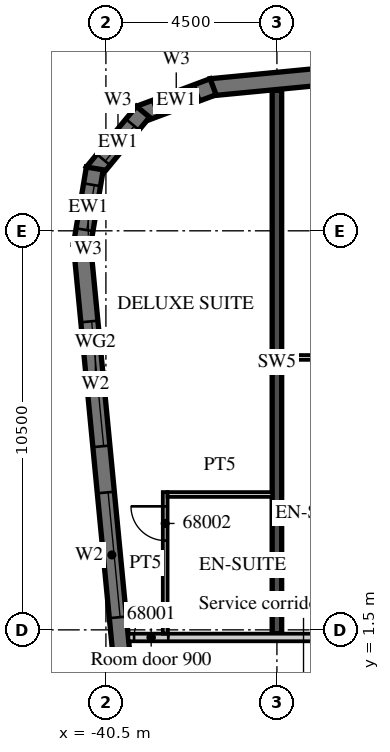
"""IFC4 building model, lengths in metres.
Left out: names, types, materials, properties, quantities, classifications, styles, units other than length and angle.
Written with IfcOpenShell. Run it as: python <this file> out.ifc"""

import sys

from ifc_helpers import new_model, si_unit, direction, frame, frame_2d, origin, place, context, subcontext, project, spatial, polyline, rectangle, outline, extrude, element, fill, save


model = new_model("IFC4")
c1 = context("Model", 3, precision=1e-05, world=origin(), true_north=direction((0.0, 1.0)))
c2 = subcontext(c1, "Body", "Model", "MODEL_VIEW")
j1 = project(units=[si_unit("LENGTHUNIT", "METRE"), si_unit("PLANEANGLEUNIT", "RADIAN")], contexts=[c1])
p1 = place(None, origin())
s1 = spatial("IfcSite", under=j1, at=p1, CompositionType="ELEMENT")
p2 = place(p1, origin())
s2 = spatial("IfcBuilding", under=s1, at=p2, CompositionType="ELEMENT")
p3 = place(p2, frame((0.0, 0.0, 275.1)))
s3 = spatial("IfcBuildingStorey", under=s2, at=p3, CompositionType="ELEMENT", Elevation=275.1)
p4 = place(p3, frame((-36.0, 1.4, 0.0), z_axis=(0.0, 0.0, 1.0), x_axis=(0.0, 1.0, 0.0)))
e1 = element("IfcWall", 1, at=p4, inside=s3, PredefinedType="SHEAR", context=c2, shape_type="SweptSolid", body=[
    extrude(rectangle(XDim=14.296, YDim=0.25, at=frame_2d((7.148, 0.0))), origin(), (0.0, 0.0, 1.0), 3.3),
])
p5 = place(p3, frame((-41.132, 11.658, 0.0), z_axis=(0.0, 0.0, 1.0), x_axis=(0.095847749461, -0.995396006082, 0.0)))
e2 = element("IfcWall", 2, at=p5, inside=s3, PredefinedType="SOLIDWALL", context=c2, shape_type="SweptSolid", body=[
    extrude(rectangle(XDim=32.0, YDim=0.45, at=frame_2d((16.0, 0.0))), origin(), (0.0, 0.0, 1.0), 3.02),
])
p6 = place(p5, frame((2.053, 0.0, 0.45)))
e3 = element("IfcOpeningElement", 3, at=p6, cuts=e2, PredefinedType="OPENING", context=c2, shape_type="SweptSolid", body=[
    extrude(rectangle(XDim=3.3, YDim=2.25, at=frame_2d((1.65, 1.125))), frame((0.0, 0.235, 0.0), z_axis=(0.0, -1.0, 0.0), x_axis=(1.0, 0.0, 0.0)), (0.0, 0.0, 1.0), 0.47),
])
p7 = place(p5, frame((6.574, 0.0, 0.45)))
e4 = element("IfcOpeningElement", 4, at=p7, cuts=e2, PredefinedType="OPENING", context=c2, shape_type="SweptSolid", body=[
    extrude(rectangle(XDim=3.3, YDim=2.25, at=frame_2d((1.65, 1.125))), frame((0.0, 0.235, 0.0), z_axis=(0.0, -1.0, 0.0), x_axis=(1.0, 0.0, 0.0)), (0.0, 0.0, 1.0), 0.47),
])
p8 = place(p3, frame((13.521, 20.713, 0.0), z_axis=(0.0, 0.0, 1.0), x_axis=(-0.995396277313, -0.095844932638, 0.0)))
e5 = element("IfcWall", 5, at=p8, inside=s3, PredefinedType="SOLIDWALL", context=c2, shape_type="SweptSolid", body=[
    extrude(rectangle(XDim=51.495, YDim=0.45, at=frame_2d((25.748, 0.0))), origin(), (0.0, 0.0, 1.0), 3.02),
])
p9 = place(p8, frame((0.91, 0.0, 0.45)))
e6 = element("IfcOpeningElement", 6, at=p9, cuts=e5, PredefinedType="OPENING", context=c2, shape_type="SweptSolid", body=[
    extrude(rectangle(XDim=2.7, YDim=2.25, at=frame_2d((1.35, 1.125))), frame((0.0, 0.235, 0.0), z_axis=(0.0, -1.0, 0.0), x_axis=(1.0, 0.0, 0.0)), (0.0, 0.0, 1.0), 0.47),
])
p10 = place(p8, frame((5.431, 0.0, 0.45)))
e7 = element("IfcOpeningElement", 7, at=p10, cuts=e5, PredefinedType="OPENING", context=c2, shape_type="SweptSolid", body=[
    extrude(rectangle(XDim=2.7, YDim=2.25, at=frame_2d((1.35, 1.125))), frame((0.0, 0.235, 0.0), z_axis=(0.0, -1.0, 0.0), x_axis=(1.0, 0.0, 0.0)), (0.0, 0.0, 1.0), 0.47),
])
p11 = place(p8, frame((9.952, 0.0, 0.45)))
e8 = element("IfcOpeningElement", 8, at=p11, cuts=e5, PredefinedType="OPENING", context=c2, shape_type="SweptSolid", body=[
    extrude(rectangle(XDim=2.7, YDim=2.25, at=frame_2d((1.35, 1.125))), frame((0.0, 0.235, 0.0), z_axis=(0.0, -1.0, 0.0), x_axis=(1.0, 0.0, 0.0)), (0.0, 0.0, 1.0), 0.47),
])
p12 = place(p8, frame((14.473, 0.0, 0.45)))
e9 = element("IfcOpeningElement", 9, at=p12, cuts=e5, PredefinedType="OPENING", context=c2, shape_type="SweptSolid", body=[
    extrude(rectangle(XDim=2.7, YDim=2.25, at=frame_2d((1.35, 1.125))), frame((0.0, 0.235, 0.0), z_axis=(0.0, -1.0, 0.0), x_axis=(1.0, 0.0, 0.0)), (0.0, 0.0, 1.0), 0.47),
])
p13 = place(p8, frame((18.994, 0.0, 0.45)))
e10 = element("IfcOpeningElement", 10, at=p13, cuts=e5, PredefinedType="OPENING", context=c2, shape_type="SweptSolid", body=[
    extrude(rectangle(XDim=2.7, YDim=2.25, at=frame_2d((1.35, 1.125))), frame((0.0, 0.235, 0.0), z_axis=(0.0, -1.0, 0.0), x_axis=(1.0, 0.0, 0.0)), (0.0, 0.0, 1.0), 0.47),
])
p14 = place(p8, frame((23.514, 0.0, 0.45)))
e11 = element("IfcOpeningElement", 11, at=p14, cuts=e5, PredefinedType="OPENING", context=c2, shape_type="SweptSolid", body=[
    extrude(rectangle(XDim=2.7, YDim=2.25, at=frame_2d((1.35, 1.125))), frame((0.0, 0.235, 0.0), z_axis=(0.0, -1.0, 0.0), x_axis=(1.0, 0.0, 0.0)), (0.0, 0.0, 1.0), 0.47),
])
p15 = place(p8, frame((28.035, 0.0, 0.45)))
e12 = element("IfcOpeningElement", 12, at=p15, cuts=e5, PredefinedType="OPENING", context=c2, shape_type="SweptSolid", body=[
    extrude(rectangle(XDim=2.7, YDim=2.25, at=frame_2d((1.35, 1.125))), frame((0.0, 0.235, 0.0), z_axis=(0.0, -1.0, 0.0), x_axis=(1.0, 0.0, 0.0)), (0.0, 0.0, 1.0), 0.47),
])
p16 = place(p8, frame((32.556, 0.0, 0.45)))
e13 = element("IfcOpeningElement", 13, at=p16, cuts=e5, PredefinedType="OPENING", context=c2, shape_type="SweptSolid", body=[
    extrude(rectangle(XDim=2.7, YDim=2.25, at=frame_2d((1.35, 1.125))), frame((0.0, 0.235, 0.0), z_axis=(0.0, -1.0, 0.0), x_axis=(1.0, 0.0, 0.0)), (0.0, 0.0, 1.0), 0.47),
])
p17 = place(p8, frame((37.077, 0.0, 0.45)))
e14 = element("IfcOpeningElement", 14, at=p17, cuts=e5, PredefinedType="OPENING", context=c2, shape_type="SweptSolid", body=[
    extrude(rectangle(XDim=2.7, YDim=2.25, at=frame_2d((1.35, 1.125))), frame((0.0, 0.235, 0.0), z_axis=(0.0, -1.0, 0.0), x_axis=(1.0, 0.0, 0.0)), (0.0, 0.0, 1.0), 0.47),
])
p18 = place(p8, frame((41.598, 0.0, 0.45)))
e15 = element("IfcOpeningElement", 15, at=p18, cuts=e5, PredefinedType="OPENING", context=c2, shape_type="SweptSolid", body=[
    extrude(rectangle(XDim=2.7, YDim=2.25, at=frame_2d((1.35, 1.125))), frame((0.0, 0.235, 0.0), z_axis=(0.0, -1.0, 0.0), x_axis=(1.0, 0.0, 0.0)), (0.0, 0.0, 1.0), 0.47),
])
p19 = place(p8, frame((46.118, 0.0, 0.45)))
e16 = element("IfcOpeningElement", 16, at=p19, cuts=e5, PredefinedType="OPENING", context=c2, shape_type="SweptSolid", body=[
    extrude(rectangle(XDim=2.7, YDim=2.25, at=frame_2d((1.35, 1.125))), frame((0.0, 0.235, 0.0), z_axis=(0.0, -1.0, 0.0), x_axis=(1.0, 0.0, 0.0)), (0.0, 0.0, 1.0), 0.47),
])
p20 = place(p3, frame((-37.679, 15.791, 0.0), z_axis=(0.0, 0.0, 1.0), x_axis=(-0.936677599948, -0.350192909346, 0.0)))
e17 = element("IfcWall", 17, at=p20, inside=s3, PredefinedType="SOLIDWALL", context=c2, shape_type="SweptSolid", body=[
    extrude(outline(polyline([(0.0, -0.225), (2.071, -0.225), (1.95, 0.225), (0.121, 0.225), (0.0, -0.225)])), origin(), (0.0, 0.0, 1.0), 3.02),
])
p21 = place(p20, frame((0.435, 0.0, 0.45)))
e18 = element("IfcOpeningElement", 18, at=p21, cuts=e17, PredefinedType="OPENING", context=c2, shape_type="SweptSolid", body=[
    extrude(rectangle(XDim=1.2, YDim=2.25, at=frame_2d((0.6, 1.125))), frame((0.0, 0.235, 0.0), z_axis=(0.0, -1.0, 0.0), x_axis=(1.0, 0.0, 0.0)), (0.0, 0.0, 1.0), 0.47),
])
p22 = place(p3, frame((-39.524, 15.133, 0.0), z_axis=(0.0, 0.0, 1.0), x_axis=(-0.636046112757, -0.771651049663, 0.0)))
e19 = element("IfcWall", 19, at=p22, inside=s3, PredefinedType="SOLIDWALL", context=c2, shape_type="SweptSolid", body=[
    extrude(outline(polyline([(0.0, -0.225), (2.071, -0.225), (1.95, 0.225), (0.121, 0.225), (0.0, -0.225)])), origin(), (0.0, 0.0, 1.0), 3.02),
])
p23 = place(p22, frame((0.435, 0.0, 0.45)))
e20 = element("IfcOpeningElement", 20, at=p23, cuts=e19, PredefinedType="OPENING", context=c2, shape_type="SweptSolid", body=[
    extrude(rectangle(XDim=1.2, YDim=2.25, at=frame_2d((0.6, 1.125))), frame((0.0, 0.235, 0.0), z_axis=(0.0, -1.0, 0.0), x_axis=(1.0, 0.0, 0.0)), (0.0, 0.0, 1.0), 0.47),
])
p24 = place(p3, frame((-40.792, 13.641, 0.0), z_axis=(0.0, 0.0, 1.0), x_axis=(-0.165068144653, -0.986282164302, 0.0)))
e21 = element("IfcWall", 21, at=p24, inside=s3, PredefinedType="SOLIDWALL", context=c2, shape_type="SweptSolid", body=[
    extrude(outline(polyline([(0.0, -0.225), (2.071, -0.225), (1.95, 0.225), (0.121, 0.225), (0.0, -0.225)])), origin(), (0.0, 0.0, 1.0), 3.02),
])
p25 = place(p24, frame((0.435, 0.0, 0.45)))
e22 = element("IfcOpeningElement", 22, at=p25, cuts=e21, PredefinedType="OPENING", context=c2, shape_type="SweptSolid", body=[
    extrude(rectangle(XDim=1.2, YDim=2.25, at=frame_2d((0.6, 1.125))), frame((0.0, 0.235, 0.0), z_axis=(0.0, -1.0, 0.0), x_axis=(1.0, 0.0, 0.0)), (0.0, 0.0, 1.0), 0.47),
])
p26 = place(p3, frame((-39.909, 1.3, 0.0), z_axis=(0.0, 0.0, 1.0), x_axis=(1.0, 0.0, 0.0)))
e23 = element("IfcWall", 23, at=p26, inside=s3, PredefinedType="PARTITIONING", context=c2, shape_type="SweptSolid", body=[
    extrude(rectangle(XDim=53.409, YDim=0.2, at=frame_2d((26.705, 0.0))), origin(), (0.0, 0.0, 1.0), 3.02),
])
p27 = place(p26, frame((0.15, 0.0, 0.0)))
e24 = element("IfcOpeningElement", 24, at=p27, cuts=e23, PredefinedType="OPENING", context=c2, shape_type="SweptSolid", body=[
    extrude(rectangle(XDim=0.9, YDim=2.1, at=frame_2d((0.45, 1.05))), frame((0.0, 0.11, 0.0), z_axis=(0.0, -1.0, 0.0), x_axis=(1.0, 0.0, 0.0)), (0.0, 0.0, 1.0), 0.22),
])
p28 = place(p26, frame((9.271, 0.0, 0.0)))
e25 = element("IfcOpeningElement", 25, at=p28, cuts=e23, PredefinedType="OPENING", context=c2, shape_type="SweptSolid", body=[
    extrude(rectangle(XDim=1.2, YDim=2.1, at=frame_2d((0.6, 1.05))), frame((0.0, 0.11, 0.0), z_axis=(0.0, -1.0, 0.0), x_axis=(1.0, 0.0, 0.0)), (0.0, 0.0, 1.0), 0.22),
])
p29 = place(p26, frame((18.271, 0.0, 0.0)))
e26 = element("IfcOpeningElement", 26, at=p29, cuts=e23, PredefinedType="OPENING", context=c2, shape_type="SweptSolid", body=[
    extrude(rectangle(XDim=1.2, YDim=2.1, at=frame_2d((0.6, 1.05))), frame((0.0, 0.11, 0.0), z_axis=(0.0, -1.0, 0.0), x_axis=(1.0, 0.0, 0.0)), (0.0, 0.0, 1.0), 0.22),
])
p30 = place(p26, frame((27.271, 0.0, 0.0)))
e27 = element("IfcOpeningElement", 27, at=p30, cuts=e23, PredefinedType="OPENING", context=c2, shape_type="SweptSolid", body=[
    extrude(rectangle(XDim=1.2, YDim=2.1, at=frame_2d((0.6, 1.05))), frame((0.0, 0.11, 0.0), z_axis=(0.0, -1.0, 0.0), x_axis=(1.0, 0.0, 0.0)), (0.0, 0.0, 1.0), 0.22),
])
p31 = place(p26, frame((36.271, 0.0, 0.0)))
e28 = element("IfcOpeningElement", 28, at=p31, cuts=e23, PredefinedType="OPENING", context=c2, shape_type="SweptSolid", body=[
    extrude(rectangle(XDim=1.2, YDim=2.1, at=frame_2d((0.6, 1.05))), frame((0.0, 0.11, 0.0), z_axis=(0.0, -1.0, 0.0), x_axis=(1.0, 0.0, 0.0)), (0.0, 0.0, 1.0), 0.22),
])
p32 = place(p26, frame((42.346, 0.0, 0.0)))
e29 = element("IfcOpeningElement", 29, at=p32, cuts=e23, PredefinedType="OPENING", context=c2, shape_type="SweptSolid", body=[
    extrude(rectangle(XDim=1.2, YDim=2.1, at=frame_2d((0.6, 1.05))), frame((0.0, 0.11, 0.0), z_axis=(0.0, -1.0, 0.0), x_axis=(1.0, 0.0, 0.0)), (0.0, 0.0, 1.0), 0.22),
])
p33 = place(p26, frame((51.834, 0.0, 0.0)))
e30 = element("IfcOpeningElement", 30, at=p33, cuts=e23, PredefinedType="OPENING", context=c2, shape_type="SweptSolid", body=[
    extrude(rectangle(XDim=1.0, YDim=2.1, at=frame_2d((0.5, 1.05))), frame((0.0, 0.11, 0.0), z_axis=(0.0, -1.0, 0.0), x_axis=(1.0, 0.0, 0.0)), (0.0, 0.0, 1.0), 0.22),
])
p34 = place(p3, frame((-38.94, 1.4, 0.0), z_axis=(0.0, 0.0, 1.0), x_axis=(0.0, 1.0, 0.0)))
e31 = element("IfcWall", 31, at=p34, inside=s3, PredefinedType="PARTITIONING", context=c2, shape_type="SweptSolid", body=[
    extrude(rectangle(XDim=3.725, YDim=0.125, at=frame_2d((1.863, 0.0))), origin(), (0.0, 0.0, 1.0), 3.02),
])
p35 = place(p34, frame((2.45, 0.0, 0.0)))
e32 = element("IfcOpeningElement", 32, at=p35, cuts=e31, PredefinedType="OPENING", context=c2, shape_type="SweptSolid", body=[
    extrude(rectangle(XDim=0.9, YDim=2.1, at=frame_2d((0.45, 1.05))), frame((0.0, 0.073, 0.0), z_axis=(0.0, -1.0, 0.0), x_axis=(1.0, 0.0, 0.0)), (0.0, 0.0, 1.0), 0.145),
])
p36 = place(p3, frame((-38.878, 5.062, 0.0), z_axis=(0.0, 0.0, 1.0), x_axis=(1.0, 0.0, 0.0)))
e33 = element("IfcWall", 33, at=p36, inside=s3, PredefinedType="PARTITIONING", context=c2, shape_type="SweptSolid", body=[
    extrude(rectangle(XDim=2.753, YDim=0.125, at=frame_2d((1.376, 0.0))), origin(), (0.0, 0.0, 1.0), 3.02),
])
p37 = place(p3, frame((-35.875, 8.668, 0.0), z_axis=(0.0, 0.0, 1.0), x_axis=(1.0, 0.0, 0.0)))
e34 = element("IfcWall", 34, at=p37, inside=s3, PredefinedType="PARTITIONING", context=c2, shape_type="SweptSolid", body=[
    extrude(rectangle(XDim=2.8, YDim=0.125, at=frame_2d((1.4, 0.0))), origin(), (0.0, 0.0, 1.0), 3.02),
])
p38 = place(p6, origin())
e35 = element("IfcWindow", 35, at=p38, inside=s3, PartitioningType="SINGLE_PANEL", PredefinedType="WINDOW", context=c2, shape_type="SweptSolid", body=[
    extrude(rectangle(XDim=3.3, YDim=2.25, at=frame_2d((1.65, 1.125))), frame((0.0, 0.09, 0.0), z_axis=(0.0, -1.0, 0.0), x_axis=(1.0, 0.0, 0.0)), (0.0, 0.0, 1.0), 0.06),
])
fill(e3, e35)
p39 = place(p7, origin())
e36 = element("IfcWindow", 36, at=p39, inside=s3, PartitioningType="SINGLE_PANEL", PredefinedType="WINDOW", context=c2, shape_type="SweptSolid", body=[
    extrude(rectangle(XDim=3.3, YDim=2.25, at=frame_2d((1.65, 1.125))), frame((0.0, 0.09, 0.0), z_axis=(0.0, -1.0, 0.0), x_axis=(1.0, 0.0, 0.0)), (0.0, 0.0, 1.0), 0.06),
])
fill(e4, e36)
p40 = place(p21, origin())
e37 = element("IfcWindow", 37, at=p40, inside=s3, PartitioningType="SINGLE_PANEL", PredefinedType="WINDOW", context=c2, shape_type="SweptSolid", body=[
    extrude(rectangle(XDim=1.2, YDim=2.25, at=frame_2d((0.6, 1.125))), frame((0.0, 0.09, 0.0), z_axis=(0.0, -1.0, 0.0), x_axis=(1.0, 0.0, 0.0)), (0.0, 0.0, 1.0), 0.06),
])
fill(e18, e37)
p41 = place(p23, origin())
e38 = element("IfcWindow", 38, at=p41, inside=s3, PartitioningType="SINGLE_PANEL", PredefinedType="WINDOW", context=c2, shape_type="SweptSolid", body=[
    extrude(rectangle(XDim=1.2, YDim=2.25, at=frame_2d((0.6, 1.125))), frame((0.0, 0.09, 0.0), z_axis=(0.0, -1.0, 0.0), x_axis=(1.0, 0.0, 0.0)), (0.0, 0.0, 1.0), 0.06),
])
fill(e20, e38)
p42 = place(p25, origin())
e39 = element("IfcWindow", 39, at=p42, inside=s3, PartitioningType="SINGLE_PANEL", PredefinedType="WINDOW", context=c2, shape_type="SweptSolid", body=[
    extrude(rectangle(XDim=1.2, YDim=2.25, at=frame_2d((0.6, 1.125))), frame((0.0, 0.09, 0.0), z_axis=(0.0, -1.0, 0.0), x_axis=(1.0, 0.0, 0.0)), (0.0, 0.0, 1.0), 0.06),
])
fill(e22, e39)
p43 = place(p27, origin())
e40 = element("IfcDoor", 40, at=p43, inside=s3, OperationType="SINGLE_SWING_RIGHT", PredefinedType="DOOR", context=c2, shape_type="SweptSolid", body=[
    extrude(rectangle(XDim=0.9, YDim=2.1, at=frame_2d((0.45, 1.05))), frame((0.0, 0.025, 0.0), z_axis=(0.0, -1.0, 0.0), x_axis=(1.0, 0.0, 0.0)), (0.0, 0.0, 1.0), 0.05),
])
fill(e24, e40)
p44 = place(p35, origin())
e41 = element("IfcDoor", 41, at=p44, inside=s3, OperationType="SINGLE_SWING_RIGHT", PredefinedType="DOOR", context=c2, shape_type="SweptSolid", body=[
    extrude(rectangle(XDim=0.9, YDim=2.1, at=frame_2d((0.45, 1.05))), frame((0.0, 0.025, 0.0), z_axis=(0.0, -1.0, 0.0), x_axis=(1.0, 0.0, 0.0)), (0.0, 0.0, 1.0), 0.05),
])
fill(e32, e41)
save(model, sys.argv[1])
